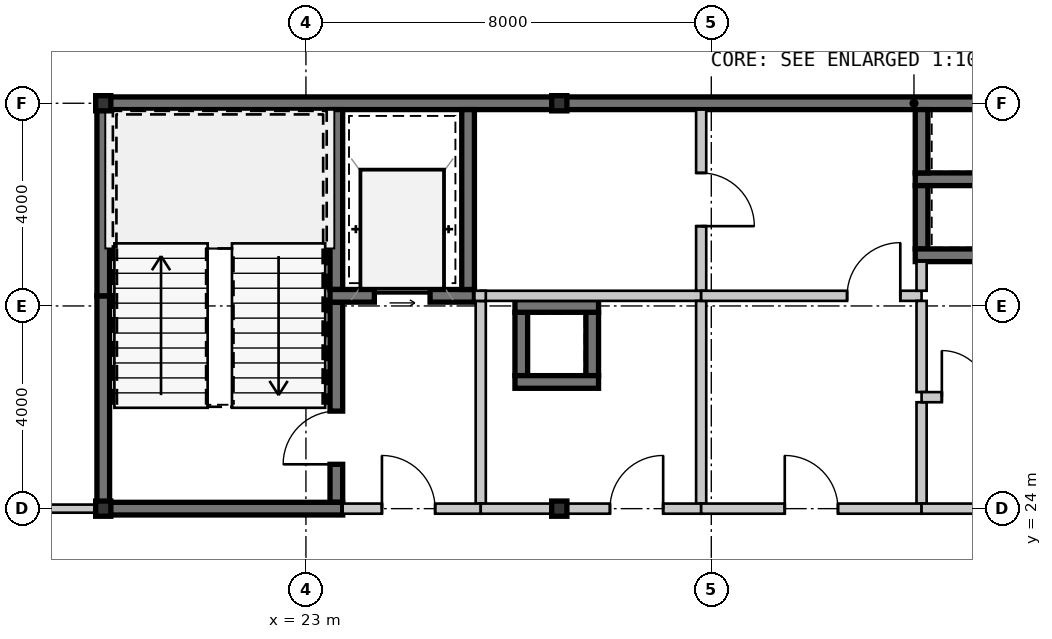
"""IFC4 building model, lengths in metres.
Left out: names, types, materials, properties, quantities, classifications, styles, units other than length and angle.
Written with IfcOpenShell. Run it as: python <this file> out.ifc"""

import sys

from ifc_helpers import new_model, si_unit, direction, frame, frame_2d, origin, origin_2d, place, context, subcontext, project, spatial, rectangle, hollow_rectangle, extrude, source, transform, mapped, element, fill, save


model = new_model("IFC4")
c1 = context("Model", 3, precision=1e-05, world=origin(), true_north=direction((0.0, 1.0)))
c2 = subcontext(c1, "Body", "Model", "MODEL_VIEW")
j1 = project(units=[si_unit("LENGTHUNIT", "METRE"), si_unit("PLANEANGLEUNIT", "RADIAN")], contexts=[c1])
p1 = place(None, origin())
s1 = spatial("IfcSite", under=j1, at=p1, CompositionType="ELEMENT")
p2 = place(p1, origin())
s2 = spatial("IfcBuilding", under=s1, at=p2, CompositionType="ELEMENT")
p3 = place(p2, frame((0.0, 0.0, 214.55)))
s3 = spatial("IfcBuildingStorey", under=s2, at=p3, CompositionType="ELEMENT", Elevation=214.55)
m1 = source(origin(), c2, "Body", "SweptSolid", [
    extrude(hollow_rectangle(XDim=0.3, YDim=0.3, WallThickness=0.012, at=origin_2d()), origin(), (0.0, 0.0, 1.0), 3.15),
])
for number, where, z_axis, x_axis in (
    (1, (19.0, 24.0, 0.0), (0.0, 0.0, 1.0), (1.0, 0.0, 0.0)),
    (2, (28.0, 24.0, 0.0), (0.0, 0.0, 1.0), (1.0, 0.0, 0.0)),
    (3, (19.0, 32.0, 0.0), (0.0, 0.0, 1.0), (1.0, 0.0, 0.0)),
    (4, (28.0, 32.0, 0.0), (0.0, 0.0, 1.0), (1.0, 0.0, 0.0)),
):
    element("IfcColumn", number, at=place(p3, frame(where, z_axis=z_axis, x_axis=x_axis)), inside=s3, PredefinedType="COLUMN", context=c2, shape_type="MappedRepresentation", body=[
        mapped(m1, transform((0.0, 0.0, 0.0), scale=1.0)),
    ])
m2 = source(origin(), c2, "Body", "SweptSolid", [
    extrude(rectangle(XDim=9.125, YDim=0.25, at=frame_2d((4.562, 0.0))), origin(), (0.0, 0.0, 1.0), 2.93),
])
p4 = place(p3, frame((18.875, 32.0, 0.0), z_axis=(0.0, 0.0, 1.0), x_axis=(1.0, 0.0, 0.0)))
e5 = element("IfcWall", 5, at=p4, inside=s3, PredefinedType="SHEAR", context=c2, shape_type="MappedRepresentation", body=[
    mapped(m2, transform((0.0, 0.0, 0.0), scale=1.0)),
])
m3 = source(origin(), c2, "Body", "SweptSolid", [
    extrude(rectangle(XDim=11.2, YDim=0.25, at=frame_2d((5.6, 0.0))), origin(), (0.0, 0.0, 1.0), 2.93),
])
p5 = place(p3, frame((28.0, 32.0, 0.0), z_axis=(0.0, 0.0, 1.0), x_axis=(1.0, 0.0, 0.0)))
e6 = element("IfcWall", 6, at=p5, inside=s3, PredefinedType="SHEAR", context=c2, shape_type="MappedRepresentation", body=[
    mapped(m3, transform((0.0, 0.0, 0.0), scale=1.0)),
])
m4 = source(origin(), c2, "Body", "SweptSolid", [
    extrude(rectangle(XDim=4.075, YDim=0.25, at=frame_2d((2.038, 0.0))), origin(), (0.0, 0.0, 1.0), 2.93),
])
p6 = place(p3, frame((19.0, 24.125, 0.0), z_axis=(0.0, 0.0, 1.0), x_axis=(0.0, 1.0, 0.0)))
e7 = element("IfcWall", 7, at=p6, inside=s3, PredefinedType="SHEAR", context=c2, shape_type="MappedRepresentation", body=[
    mapped(m4, transform((0.0, 0.0, 0.0), scale=1.0)),
])
m5 = source(origin(), c2, "Body", "SweptSolid", [
    extrude(rectangle(XDim=3.675, YDim=0.25, at=frame_2d((1.837, 0.0))), origin(), (0.0, 0.0, 1.0), 2.93),
])
p7 = place(p3, frame((19.0, 28.2, 0.0), z_axis=(0.0, 0.0, 1.0), x_axis=(0.0, 1.0, 0.0)))
e8 = element("IfcWall", 8, at=p7, inside=s3, PredefinedType="SHEAR", context=c2, shape_type="MappedRepresentation", body=[
    mapped(m5, transform((0.0, 0.0, 0.0), scale=1.0)),
])
m6 = source(origin(), c2, "Body", "SweptSolid", [
    extrude(rectangle(XDim=3.55, YDim=0.25, at=frame_2d((1.775, 0.0))), origin(), (0.0, 0.0, 1.0), 2.93),
])
p8 = place(p3, frame((23.6, 28.325, 0.0), z_axis=(0.0, 0.0, 1.0), x_axis=(0.0, 1.0, 0.0)))
e9 = element("IfcWall", 9, at=p8, inside=s3, PredefinedType="SHEAR", context=c2, shape_type="MappedRepresentation", body=[
    mapped(m6, transform((0.0, 0.0, 0.0), scale=1.0)),
])
m7 = source(origin(), c2, "Body", "SweptSolid", [
    extrude(rectangle(XDim=3.95, YDim=0.25, at=frame_2d((1.975, 0.0))), origin(), (0.0, 0.0, 1.0), 2.93),
])
p9 = place(p3, frame((23.6, 24.125, 0.0), z_axis=(0.0, 0.0, 1.0), x_axis=(0.0, 1.0, 0.0)))
e10 = element("IfcWall", 10, at=p9, inside=s3, PredefinedType="SHEAR", context=c2, shape_type="MappedRepresentation", body=[
    mapped(m7, transform((0.0, 0.0, 0.0), scale=1.0)),
])
m8 = source(origin(), c2, "Body", "SweptSolid", [
    extrude(rectangle(XDim=1.05, YDim=2.1, at=frame_2d((0.525, 1.05))), frame((0.0, 0.135, 0.0), z_axis=(0.0, -1.0, 0.0), x_axis=(1.0, 0.0, 0.0)), (0.0, 0.0, 1.0), 0.27),
])
p10 = place(p9, frame((0.75, 0.0, 0.0)))
e11 = element("IfcOpeningElement", 11, at=p10, cuts=e10, PredefinedType="OPENING", context=c2, shape_type="MappedRepresentation", body=[
    mapped(m8, transform((0.0, 0.0, 0.0), scale=1.0)),
])
m9 = source(origin(), c2, "Body", "SweptSolid", [
    extrude(rectangle(XDim=4.85, YDim=0.25, at=frame_2d((2.425, 0.0))), origin(), (0.0, 0.0, 1.0), 2.93),
])
p11 = place(p3, frame((18.875, 24.0, 0.0), z_axis=(0.0, 0.0, 1.0), x_axis=(1.0, 0.0, 0.0)))
e12 = element("IfcWall", 12, at=p11, inside=s3, PredefinedType="SHEAR", context=c2, shape_type="MappedRepresentation", body=[
    mapped(m9, transform((0.0, 0.0, 0.0), scale=1.0)),
])
m10 = source(origin(), c2, "Body", "SweptSolid", [
    extrude(rectangle(XDim=2.85, YDim=0.25, at=frame_2d((1.425, 0.0))), origin(), (0.0, 0.0, 1.0), 2.93),
])
p12 = place(p3, frame((23.475, 28.2, 0.0), z_axis=(0.0, 0.0, 1.0), x_axis=(1.0, 0.0, 0.0)))
e13 = element("IfcWall", 13, at=p12, inside=s3, PredefinedType="SHEAR", context=c2, shape_type="MappedRepresentation", body=[
    mapped(m10, transform((0.0, 0.0, 0.0), scale=1.0)),
])
m11 = source(origin(), c2, "Body", "SweptSolid", [
    extrude(rectangle(XDim=1.1, YDim=2.15, at=frame_2d((0.55, 1.075))), frame((0.0, 0.135, 0.0), z_axis=(0.0, -1.0, 0.0), x_axis=(1.0, 0.0, 0.0)), (0.0, 0.0, 1.0), 0.27),
])
p13 = place(p12, frame((0.875, 0.0, 0.0)))
e14 = element("IfcOpeningElement", 14, at=p13, cuts=e13, PredefinedType="OPENING", context=c2, shape_type="MappedRepresentation", body=[
    mapped(m11, transform((0.0, 0.0, 0.0), scale=1.0)),
])
p14 = place(p3, frame((26.2, 28.325, 0.0), z_axis=(0.0, 0.0, 1.0), x_axis=(0.0, 1.0, 0.0)))
e15 = element("IfcWall", 15, at=p14, inside=s3, PredefinedType="SHEAR", context=c2, shape_type="MappedRepresentation", body=[
    mapped(m6, transform((0.0, 0.0, 0.0), scale=1.0)),
])
m12 = source(origin(), c2, "Body", "SweptSolid", [
    extrude(rectangle(XDim=4.0, YDim=0.2, at=frame_2d((2.0, 0.0))), origin(), (0.0, 0.0, 1.0), 2.93),
])
p15 = place(p3, frame((26.45, 24.1, 0.0), z_axis=(0.0, 0.0, 1.0), x_axis=(0.0, 1.0, 0.0)))
e16 = element("IfcWall", 16, at=p15, inside=s3, PredefinedType="SOLIDWALL", context=c2, shape_type="MappedRepresentation", body=[
    mapped(m12, transform((0.0, 0.0, 0.0), scale=1.0)),
])
m13 = source(origin(), c2, "Body", "SweptSolid", [
    extrude(rectangle(XDim=2.725, YDim=0.2, at=frame_2d((1.362, 0.0))), origin(), (0.0, 0.0, 1.0), 2.47),
])
p16 = place(p3, frame((23.725, 24.0, 0.0), z_axis=(0.0, 0.0, 1.0), x_axis=(1.0, 0.0, 0.0)))
e17 = element("IfcWall", 17, at=p16, inside=s3, PredefinedType="SOLIDWALL", context=c2, shape_type="MappedRepresentation", body=[
    mapped(m13, transform((0.0, 0.0, 0.0), scale=1.0)),
])
m14 = source(origin(), c2, "Body", "SweptSolid", [
    extrude(rectangle(XDim=1.05, YDim=2.1, at=frame_2d((0.525, 1.05))), frame((0.0, 0.11, 0.0), z_axis=(0.0, -1.0, 0.0), x_axis=(1.0, 0.0, 0.0)), (0.0, 0.0, 1.0), 0.22),
])
p17 = place(p16, frame((0.775, 0.0, 0.0)))
e18 = element("IfcOpeningElement", 18, at=p17, cuts=e17, PredefinedType="OPENING", context=c2, shape_type="MappedRepresentation", body=[
    mapped(m14, transform((0.0, 0.0, 0.0), scale=1.0)),
])
m15 = source(origin(), c2, "Body", "SweptSolid", [
    extrude(rectangle(XDim=1.95, YDim=0.25, at=frame_2d((0.975, 0.0))), origin(), (0.0, 0.0, 1.0), 2.93),
])
p18 = place(p3, frame((35.025, 30.5, 0.0), z_axis=(0.0, 0.0, 1.0), x_axis=(1.0, 0.0, 0.0)))
e19 = element("IfcWall", 19, at=p18, inside=s3, PredefinedType="SHEAR", context=c2, shape_type="MappedRepresentation", body=[
    mapped(m15, transform((0.0, 0.0, 0.0), scale=1.0)),
])
m16 = source(origin(), c2, "Body", "SweptSolid", [
    extrude(rectangle(XDim=1.25, YDim=0.25, at=frame_2d((0.625, 0.0))), origin(), (0.0, 0.0, 1.0), 2.93),
])
for number, where, z_axis, x_axis in (
    (20, (35.15, 31.875, 0.0), (0.0, 0.0, 1.0), (0.0, -1.0, 0.0)),
    (21, (35.15, 30.375, 0.0), (0.0, 0.0, 1.0), (0.0, -1.0, 0.0)),
):
    element("IfcWall", number, at=place(p3, frame(where, z_axis=z_axis, x_axis=x_axis)), inside=s3, PredefinedType="SHEAR", context=c2, shape_type="MappedRepresentation", body=[
        mapped(m16, transform((0.0, 0.0, 0.0), scale=1.0)),
    ])
p19 = place(p3, frame((35.025, 29.0, 0.0), z_axis=(0.0, 0.0, 1.0), x_axis=(1.0, 0.0, 0.0)))
e22 = element("IfcWall", 22, at=p19, inside=s3, PredefinedType="SHEAR", context=c2, shape_type="MappedRepresentation", body=[
    mapped(m15, transform((0.0, 0.0, 0.0), scale=1.0)),
])
for number, where, z_axis, x_axis in (
    (23, (28.65, 26.625, 0.0), (0.0, 0.0, 1.0), (0.0, 1.0, 0.0)),
    (24, (27.25, 27.875, 0.0), (0.0, 0.0, 1.0), (0.0, -1.0, 0.0)),
):
    element("IfcWall", number, at=place(p3, frame(where, z_axis=z_axis, x_axis=x_axis)), inside=s3, PredefinedType="SHEAR", context=c2, shape_type="MappedRepresentation", body=[
        mapped(m16, transform((0.0, 0.0, 0.0), scale=1.0)),
    ])
m17 = source(origin(), c2, "Body", "SweptSolid", [
    extrude(rectangle(XDim=1.65, YDim=0.25, at=frame_2d((0.825, 0.0))), origin(), (0.0, 0.0, 1.0), 2.93),
])
for number, where, z_axis, x_axis in (
    (25, (28.775, 28.0, 0.0), (0.0, 0.0, 1.0), (-1.0, 0.0, 0.0)),
    (26, (27.125, 26.5, 0.0), (0.0, 0.0, 1.0), (1.0, 0.0, 0.0)),
):
    element("IfcWall", number, at=place(p3, frame(where, z_axis=z_axis, x_axis=x_axis)), inside=s3, PredefinedType="SHEAR", context=c2, shape_type="MappedRepresentation", body=[
        mapped(m17, transform((0.0, 0.0, 0.0), scale=1.0)),
    ])
m18 = source(origin(), c2, "Body", "SweptSolid", [
    extrude(rectangle(XDim=4.35, YDim=0.2, at=frame_2d((2.175, 0.0))), origin(), (0.0, 0.0, 1.0), 2.93),
])
p20 = place(p3, frame((26.45, 28.2, 0.0), z_axis=(0.0, 0.0, 1.0), x_axis=(1.0, 0.0, 0.0)))
e27 = element("IfcWall", 27, at=p20, inside=s3, PredefinedType="SOLIDWALL", context=c2, shape_type="MappedRepresentation", body=[
    mapped(m18, transform((0.0, 0.0, 0.0), scale=1.0)),
])
p21 = place(p3, frame((30.8, 28.1, 0.0), z_axis=(0.0, 0.0, 1.0), x_axis=(0.0, -1.0, 0.0)))
e28 = element("IfcWall", 28, at=p21, inside=s3, PredefinedType="SOLIDWALL", context=c2, shape_type="MappedRepresentation", body=[
    mapped(m12, transform((0.0, 0.0, 0.0), scale=1.0)),
])
m19 = source(origin(), c2, "Body", "SweptSolid", [
    extrude(rectangle(XDim=4.35, YDim=0.2, at=frame_2d((2.175, 0.0))), origin(), (0.0, 0.0, 1.0), 2.47),
])
p22 = place(p3, frame((30.8, 24.0, 0.0), z_axis=(0.0, 0.0, 1.0), x_axis=(-1.0, 0.0, 0.0)))
e29 = element("IfcWall", 29, at=p22, inside=s3, PredefinedType="SOLIDWALL", context=c2, shape_type="MappedRepresentation", body=[
    mapped(m19, transform((0.0, 0.0, 0.0), scale=1.0)),
])
p23 = place(p22, frame((0.75, 0.0, 0.0)))
e30 = element("IfcOpeningElement", 30, at=p23, cuts=e29, PredefinedType="OPENING", context=c2, shape_type="MappedRepresentation", body=[
    mapped(m14, transform((0.0, 0.0, 0.0), scale=1.0)),
])
m20 = source(origin(), c2, "Body", "SweptSolid", [
    extrude(rectangle(XDim=3.575, YDim=0.2, at=frame_2d((1.788, 0.0))), origin(), (0.0, 0.0, 1.0), 2.93),
])
p24 = place(p3, frame((30.8, 31.875, 0.0), z_axis=(0.0, 0.0, 1.0), x_axis=(0.0, -1.0, 0.0)))
e31 = element("IfcWall", 31, at=p24, inside=s3, PredefinedType="SOLIDWALL", context=c2, shape_type="MappedRepresentation", body=[
    mapped(m20, transform((0.0, 0.0, 0.0), scale=1.0)),
])
p25 = place(p24, frame((1.25, 0.0, 0.0)))
e32 = element("IfcOpeningElement", 32, at=p25, cuts=e31, PredefinedType="OPENING", context=c2, shape_type="MappedRepresentation", body=[
    mapped(m14, transform((0.0, 0.0, 0.0), scale=1.0)),
])
m21 = source(origin(), c2, "Body", "SweptSolid", [
    extrude(rectangle(XDim=4.35, YDim=0.2, at=frame_2d((2.175, 0.0))), origin(), (0.0, 0.0, 1.0), 2.93),
])
p26 = place(p3, frame((30.8, 28.2, 0.0), z_axis=(0.0, 0.0, 1.0), x_axis=(1.0, 0.0, 0.0)))
e33 = element("IfcWall", 33, at=p26, inside=s3, PredefinedType="SOLIDWALL", context=c2, shape_type="MappedRepresentation", body=[
    mapped(m21, transform((0.0, 0.0, 0.0), scale=1.0)),
])
p27 = place(p26, frame((2.88, 0.0, 0.0)))
e34 = element("IfcOpeningElement", 34, at=p27, cuts=e33, PredefinedType="OPENING", context=c2, shape_type="MappedRepresentation", body=[
    mapped(m14, transform((0.0, 0.0, 0.0), scale=1.0)),
])
m22 = source(origin(), c2, "Body", "SweptSolid", [
    extrude(rectangle(XDim=2.0, YDim=0.2, at=frame_2d((1.0, 0.0))), origin(), (0.0, 0.0, 1.0), 2.93),
])
p28 = place(p3, frame((35.15, 26.1, 0.0), z_axis=(0.0, 0.0, 1.0), x_axis=(0.0, -1.0, 0.0)))
e35 = element("IfcWall", 35, at=p28, inside=s3, PredefinedType="SOLIDWALL", context=c2, shape_type="MappedRepresentation", body=[
    mapped(m22, transform((0.0, 0.0, 0.0), scale=1.0)),
])
m23 = source(origin(), c2, "Body", "SweptSolid", [
    extrude(rectangle(XDim=1.8, YDim=0.2, at=frame_2d((0.9, 0.0))), origin(), (0.0, 0.0, 1.0), 2.93),
])
p29 = place(p3, frame((35.15, 28.1, 0.0), z_axis=(0.0, 0.0, 1.0), x_axis=(0.0, -1.0, 0.0)))
e36 = element("IfcWall", 36, at=p29, inside=s3, PredefinedType="SOLIDWALL", context=c2, shape_type="MappedRepresentation", body=[
    mapped(m23, transform((0.0, 0.0, 0.0), scale=1.0)),
])
m24 = source(origin(), c2, "Body", "SweptSolid", [
    extrude(rectangle(XDim=4.35, YDim=0.2, at=frame_2d((2.175, 0.0))), origin(), (0.0, 0.0, 1.0), 2.47),
])
p30 = place(p3, frame((35.15, 24.0, 0.0), z_axis=(0.0, 0.0, 1.0), x_axis=(-1.0, 0.0, 0.0)))
e37 = element("IfcWall", 37, at=p30, inside=s3, PredefinedType="SOLIDWALL", context=c2, shape_type="MappedRepresentation", body=[
    mapped(m24, transform((0.0, 0.0, 0.0), scale=1.0)),
])
p31 = place(p30, frame((1.65, 0.0, 0.0)))
e38 = element("IfcOpeningElement", 38, at=p31, cuts=e37, PredefinedType="OPENING", context=c2, shape_type="MappedRepresentation", body=[
    mapped(m14, transform((0.0, 0.0, 0.0), scale=1.0)),
])
m25 = source(origin(), c2, "Body", "SweptSolid", [
    extrude(rectangle(XDim=0.575, YDim=0.2, at=frame_2d((0.288, 0.0))), origin(), (0.0, 0.0, 1.0), 2.93),
])
p32 = place(p3, frame((35.15, 28.875, 0.0), z_axis=(0.0, 0.0, 1.0), x_axis=(0.0, -1.0, 0.0)))
e39 = element("IfcWall", 39, at=p32, inside=s3, PredefinedType="SOLIDWALL", context=c2, shape_type="MappedRepresentation", body=[
    mapped(m25, transform((0.0, 0.0, 0.0), scale=1.0)),
])
m26 = source(origin(), c2, "Body", "SweptSolid", [
    extrude(rectangle(XDim=1.72, YDim=0.2, at=frame_2d((0.86, 0.0))), origin(), (0.0, 0.0, 1.0), 2.93),
])
p33 = place(p3, frame((35.15, 26.2, 0.0), z_axis=(0.0, 0.0, 1.0), x_axis=(1.0, 0.0, 0.0)))
e40 = element("IfcWall", 40, at=p33, inside=s3, PredefinedType="SOLIDWALL", context=c2, shape_type="MappedRepresentation", body=[
    mapped(m26, transform((0.0, 0.0, 0.0), scale=1.0)),
])
m27 = source(origin(), c2, "Body", "SweptSolid", [
    extrude(rectangle(XDim=0.92, YDim=2.1, at=frame_2d((0.46, 1.05))), frame((0.0, 0.11, 0.0), z_axis=(0.0, -1.0, 0.0), x_axis=(1.0, 0.0, 0.0)), (0.0, 0.0, 1.0), 0.22),
])
p34 = place(p33, frame((0.4, 0.0, 0.0)))
e41 = element("IfcOpeningElement", 41, at=p34, cuts=e40, PredefinedType="OPENING", context=c2, shape_type="MappedRepresentation", body=[
    mapped(m27, transform((0.0, 0.0, 0.0), scale=1.0)),
])
m28 = source(origin(), c2, "Body", "SweptSolid", [
    extrude(rectangle(XDim=4.05, YDim=0.2, at=frame_2d((2.025, 0.0))), origin(), (0.0, 0.0, 1.0), 2.47),
])
p35 = place(p3, frame((39.2, 24.0, 0.0), z_axis=(0.0, 0.0, 1.0), x_axis=(-1.0, 0.0, 0.0)))
e42 = element("IfcWall", 42, at=p35, inside=s3, PredefinedType="SOLIDWALL", context=c2, shape_type="MappedRepresentation", body=[
    mapped(m28, transform((0.0, 0.0, 0.0), scale=1.0)),
])
p36 = place(p35, frame((1.5, 0.0, 0.0)))
e43 = element("IfcOpeningElement", 43, at=p36, cuts=e42, PredefinedType="OPENING", context=c2, shape_type="MappedRepresentation", body=[
    mapped(m14, transform((0.0, 0.0, 0.0), scale=1.0)),
])
m29 = source(origin(), c2, "Body", "SweptSolid", [
    extrude(rectangle(XDim=6.032, YDim=0.16, at=frame_2d((3.016, 0.0))), origin(), (0.0, 0.0, 1.0), 2.93),
])
p37 = place(p3, frame((12.843, 24.0, 0.0), z_axis=(0.0, 0.0, 1.0), x_axis=(1.0, 0.0, 0.0)))
e44 = element("IfcWall", 44, at=p37, inside=s3, PredefinedType="PARTITIONING", context=c2, shape_type="MappedRepresentation", body=[
    mapped(m29, transform((0.0, 0.0, 0.0), scale=1.0)),
])
m30 = source(origin(), c2, "Body", "SweptSolid", [
    extrude(rectangle(XDim=0.92, YDim=2.1, at=frame_2d((0.46, 1.05))), frame((0.0, 0.09, 0.0), z_axis=(0.0, -1.0, 0.0), x_axis=(1.0, 0.0, 0.0)), (0.0, 0.0, 1.0), 0.18),
])
p38 = place(p37, frame((2.608, 0.0, 0.0)))
e45 = element("IfcOpeningElement", 45, at=p38, cuts=e44, PredefinedType="OPENING", context=c2, shape_type="MappedRepresentation", body=[
    mapped(m30, transform((0.0, 0.0, 0.0), scale=1.0)),
])
m31 = source(origin(), c2, "Body", "SweptSolid", [
    extrude(rectangle(XDim=0.225, YDim=0.2, at=frame_2d((0.113, 0.0))), origin(), (0.0, 0.0, 1.0), 2.93),
])
p39 = place(p3, frame((26.325, 28.2, 0.0), z_axis=(0.0, 0.0, 1.0), x_axis=(1.0, 0.0, 0.0)))
e46 = element("IfcWall", 46, at=p39, inside=s3, PredefinedType="SOLIDWALL", context=c2, shape_type="MappedRepresentation", body=[
    mapped(m31, transform((0.0, 0.0, 0.0), scale=1.0)),
])
m32 = source(origin(), c2, "Body", "SweptSolid", [
    extrude(rectangle(XDim=1.05, YDim=2.1, at=frame_2d((0.525, 1.05))), frame((0.0, 0.025, 0.0), z_axis=(0.0, -1.0, 0.0), x_axis=(1.0, 0.0, 0.0)), (0.0, 0.0, 1.0), 0.05),
])
p40 = place(p10, origin())
e47 = element("IfcDoor", 47, at=p40, inside=s3, OperationType="SINGLE_SWING_LEFT", PredefinedType="DOOR", context=c2, shape_type="MappedRepresentation", body=[
    mapped(m32, transform((0.0, 0.0, 0.0), scale=1.0)),
])
fill(e11, e47)
m33 = source(origin(), c2, "Body", "SweptSolid", [
    extrude(rectangle(XDim=1.1, YDim=2.15, at=frame_2d((0.55, 1.075))), frame((0.0, 0.025, 0.0), z_axis=(0.0, -1.0, 0.0), x_axis=(1.0, 0.0, 0.0)), (0.0, 0.0, 1.0), 0.05),
])
p41 = place(p13, origin())
e48 = element("IfcDoor", 48, at=p41, inside=s3, OperationType="SLIDING_TO_LEFT", PredefinedType="DOOR", context=c2, shape_type="MappedRepresentation", body=[
    mapped(m33, transform((0.0, 0.0, 0.0), scale=1.0)),
])
fill(e14, e48)
p42 = place(p17, origin())
e49 = element("IfcDoor", 49, at=p42, inside=s3, OperationType="SINGLE_SWING_LEFT", PredefinedType="DOOR", context=c2, shape_type="MappedRepresentation", body=[
    mapped(m32, transform((0.0, 0.0, 0.0), scale=1.0)),
])
fill(e18, e49)
p43 = place(p23, frame((1.05, 0.0, 0.0), z_axis=(0.0, 0.0, 1.0), x_axis=(-1.0, 0.0, 0.0)))
e50 = element("IfcDoor", 50, at=p43, inside=s3, OperationType="SINGLE_SWING_RIGHT", PredefinedType="DOOR", context=c2, shape_type="MappedRepresentation", body=[
    mapped(m32, transform((0.0, 0.0, 0.0), scale=1.0)),
])
fill(e30, e50)
p44 = place(p25, origin())
e51 = element("IfcDoor", 51, at=p44, inside=s3, OperationType="SINGLE_SWING_RIGHT", PredefinedType="DOOR", context=c2, shape_type="MappedRepresentation", body=[
    mapped(m32, transform((0.0, 0.0, 0.0), scale=1.0)),
])
fill(e32, e51)
p45 = place(p27, origin())
e52 = element("IfcDoor", 52, at=p45, inside=s3, OperationType="SINGLE_SWING_RIGHT", PredefinedType="DOOR", context=c2, shape_type="MappedRepresentation", body=[
    mapped(m32, transform((0.0, 0.0, 0.0), scale=1.0)),
])
fill(e34, e52)
p46 = place(p31, frame((1.05, 0.0, 0.0), z_axis=(0.0, 0.0, 1.0), x_axis=(-1.0, 0.0, 0.0)))
e53 = element("IfcDoor", 53, at=p46, inside=s3, OperationType="SINGLE_SWING_LEFT", PredefinedType="DOOR", context=c2, shape_type="MappedRepresentation", body=[
    mapped(m32, transform((0.0, 0.0, 0.0), scale=1.0)),
])
fill(e38, e53)
m34 = source(origin(), c2, "Body", "SweptSolid", [
    extrude(rectangle(XDim=0.92, YDim=2.1, at=frame_2d((0.46, 1.05))), frame((0.0, 0.025, 0.0), z_axis=(0.0, -1.0, 0.0), x_axis=(1.0, 0.0, 0.0)), (0.0, 0.0, 1.0), 0.05),
])
p47 = place(p34, origin())
e54 = element("IfcDoor", 54, at=p47, inside=s3, OperationType="SINGLE_SWING_LEFT", PredefinedType="DOOR", context=c2, shape_type="MappedRepresentation", body=[
    mapped(m34, transform((0.0, 0.0, 0.0), scale=1.0)),
])
fill(e41, e54)
save(model, sys.argv[1])
